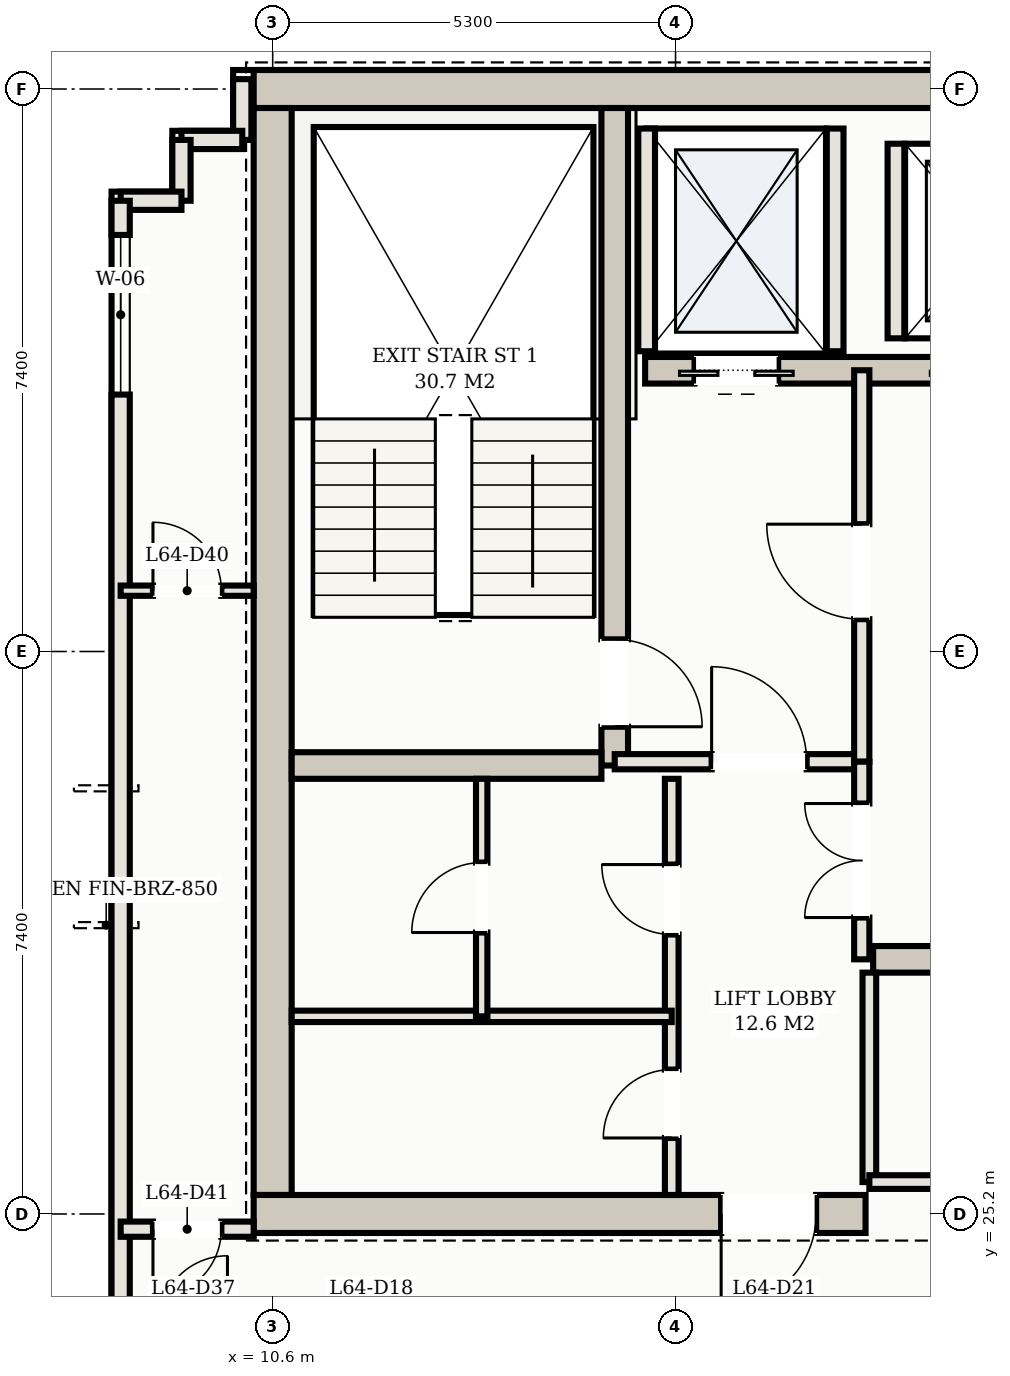
"""IFC4 building model, lengths in metres.
Left out: names, types, materials, properties, quantities, classifications, styles, units other than length and angle.
Written with IfcOpenShell. Run it as: python <this file> out.ifc"""

import sys

from ifc_helpers import new_model, si_unit, direction, frame, frame_2d, origin, place, context, subcontext, project, spatial, rectangle, extrude, element, fill, save


model = new_model("IFC4")
c1 = context("Model", 3, precision=1e-05, world=origin(), true_north=direction((0.0, 1.0)))
c2 = subcontext(c1, "Body", "Model", "MODEL_VIEW")
j1 = project(units=[si_unit("LENGTHUNIT", "METRE"), si_unit("PLANEANGLEUNIT", "RADIAN")], contexts=[c1])
p1 = place(None, origin())
s1 = spatial("IfcSite", under=j1, at=p1, CompositionType="ELEMENT")
p2 = place(p1, origin())
s2 = spatial("IfcBuilding", under=s1, at=p2, CompositionType="ELEMENT")
p3 = place(p2, frame((0.0, 0.0, 233.0)))
s3 = spatial("IfcBuildingStorey", under=s2, at=p3, CompositionType="ELEMENT", Elevation=233.0)
p4 = place(p3, frame((10.35, 40.0, 0.0), z_axis=(0.0, 0.0, 1.0), x_axis=(1.0, 0.0, 0.0)))
e1 = element("IfcWall", 1, at=p4, inside=s3, PredefinedType="SHEAR", context=c2, shape_type="SweptSolid", body=[
    extrude(rectangle(XDim=32.3, YDim=0.5, at=frame_2d((16.15, 0.0))), origin(), (0.0, 0.0, 1.0), 3.11),
])
p5 = place(p3, frame((10.6, 25.45, 0.0), z_axis=(0.0, 0.0, 1.0), x_axis=(0.0, 1.0, 0.0)))
e2 = element("IfcWall", 2, at=p5, inside=s3, PredefinedType="SHEAR", context=c2, shape_type="SweptSolid", body=[
    extrude(rectangle(XDim=14.3, YDim=0.5, at=frame_2d((7.15, 0.0))), origin(), (0.0, 0.0, 1.0), 3.11),
])
p6 = place(p3, frame((10.35, 25.2, 0.0), z_axis=(0.0, 0.0, 1.0), x_axis=(1.0, 0.0, 0.0)))
e3 = element("IfcWall", 3, at=p6, inside=s3, PredefinedType="SHEAR", context=c2, shape_type="SweptSolid", body=[
    extrude(rectangle(XDim=8.05, YDim=0.5, at=frame_2d((4.025, 0.0))), origin(), (0.0, 0.0, 1.0), 3.11),
])
p7 = place(p6, frame((6.15, 0.0, 0.0)))
e4 = element("IfcOpeningElement", 4, at=p7, cuts=e3, PredefinedType="OPENING", context=c2, shape_type="SweptSolid", body=[
    extrude(rectangle(XDim=1.25, YDim=2.2, at=frame_2d((0.625, 1.1))), frame((0.0, 0.26, 0.0), z_axis=(0.0, -1.0, 0.0), x_axis=(1.0, 0.0, 0.0)), (0.0, 0.0, 1.0), 0.52),
])
p8 = place(p3, frame((15.1, 31.1, 0.0), z_axis=(0.0, 0.0, 1.0), x_axis=(0.0, 1.0, 0.0)))
e5 = element("IfcWall", 5, at=p8, inside=s3, PredefinedType="SHEAR", context=c2, shape_type="SweptSolid", body=[
    extrude(rectangle(XDim=8.65, YDim=0.35, at=frame_2d((4.325, 0.0))), origin(), (0.0, 0.0, 1.0), 3.11),
])
p9 = place(p8, frame((0.51, 0.0, 0.0)))
e6 = element("IfcOpeningElement", 6, at=p9, cuts=e5, PredefinedType="OPENING", context=c2, shape_type="SweptSolid", body=[
    extrude(rectangle(XDim=1.15, YDim=2.2, at=frame_2d((0.575, 1.1))), frame((0.0, 0.185, 0.0), z_axis=(0.0, -1.0, 0.0), x_axis=(1.0, 0.0, 0.0)), (0.0, 0.0, 1.0), 0.37),
])
p10 = place(p3, frame((10.85, 31.1, 0.0), z_axis=(0.0, 0.0, 1.0), x_axis=(1.0, 0.0, 0.0)))
e7 = element("IfcWall", 7, at=p10, inside=s3, PredefinedType="SHEAR", context=c2, shape_type="SweptSolid", body=[
    extrude(rectangle(XDim=4.075, YDim=0.35, at=frame_2d((2.038, 0.0))), origin(), (0.0, 0.0, 1.0), 3.11),
])
p11 = place(p3, frame((15.5, 36.3, 0.0), z_axis=(0.0, 0.0, 1.0), x_axis=(1.0, 0.0, 0.0)))
e8 = element("IfcWall", 8, at=p11, inside=s3, PredefinedType="SHEAR", context=c2, shape_type="SweptSolid", body=[
    extrude(rectangle(XDim=22.0, YDim=0.35, at=frame_2d((11.0, 0.0))), origin(), (0.0, 0.0, 1.0), 3.11),
])
p12 = place(p11, frame((0.65, 0.0, 0.0)))
e9 = element("IfcOpeningElement", 9, at=p12, cuts=e8, PredefinedType="OPENING", context=c2, shape_type="SweptSolid", body=[
    extrude(rectangle(XDim=1.1, YDim=2.15, at=frame_2d((0.55, 1.075))), frame((0.0, 0.185, 0.0), z_axis=(0.0, -1.0, 0.0), x_axis=(1.0, 0.0, 0.0)), (0.0, 0.0, 1.0), 0.37),
])
p13 = place(p11, frame((20.25, 0.0, 0.0)))
e10 = element("IfcOpeningElement", 10, at=p13, cuts=e8, PredefinedType="OPENING", context=c2, shape_type="SweptSolid", body=[
    extrude(rectangle(XDim=1.1, YDim=2.15, at=frame_2d((0.55, 1.075))), frame((0.0, 0.185, 0.0), z_axis=(0.0, -1.0, 0.0), x_axis=(1.0, 0.0, 0.0)), (0.0, 0.0, 1.0), 0.37),
])
p14 = place(p11, frame((17.05, 0.0, 0.0)))
e11 = element("IfcOpeningElement", 11, at=p14, cuts=e8, PredefinedType="OPENING", context=c2, shape_type="SweptSolid", body=[
    extrude(rectangle(XDim=1.3, YDim=2.2, at=frame_2d((0.65, 1.1))), frame((0.0, 0.185, 0.0), z_axis=(0.0, -1.0, 0.0), x_axis=(1.0, 0.0, 0.0)), (0.0, 0.0, 1.0), 0.37),
])
p15 = place(p11, frame((3.95, 0.0, 0.0)))
e12 = element("IfcOpeningElement", 12, at=p15, cuts=e8, PredefinedType="OPENING", context=c2, shape_type="SweptSolid", body=[
    extrude(rectangle(XDim=1.1, YDim=2.15, at=frame_2d((0.55, 1.075))), frame((0.0, 0.185, 0.0), z_axis=(0.0, -1.0, 0.0), x_axis=(1.0, 0.0, 0.0)), (0.0, 0.0, 1.0), 0.37),
])
p16 = place(p11, frame((6.55, 0.0, 0.0)))
e13 = element("IfcOpeningElement", 13, at=p16, cuts=e8, PredefinedType="OPENING", context=c2, shape_type="SweptSolid", body=[
    extrude(rectangle(XDim=1.1, YDim=2.15, at=frame_2d((0.55, 1.075))), frame((0.0, 0.185, 0.0), z_axis=(0.0, -1.0, 0.0), x_axis=(1.0, 0.0, 0.0)), (0.0, 0.0, 1.0), 0.37),
])
p17 = place(p11, frame((9.15, 0.0, 0.0)))
e14 = element("IfcOpeningElement", 14, at=p17, cuts=e8, PredefinedType="OPENING", context=c2, shape_type="SweptSolid", body=[
    extrude(rectangle(XDim=1.1, YDim=2.15, at=frame_2d((0.55, 1.075))), frame((0.0, 0.185, 0.0), z_axis=(0.0, -1.0, 0.0), x_axis=(1.0, 0.0, 0.0)), (0.0, 0.0, 1.0), 0.37),
])
p18 = place(p3, frame((18.5, 28.55, 0.0), z_axis=(0.0, 0.0, 1.0), x_axis=(1.0, 0.0, 0.0)))
e15 = element("IfcWall", 15, at=p18, inside=s3, PredefinedType="SHEAR", context=c2, shape_type="SweptSolid", body=[
    extrude(rectangle(XDim=16.0, YDim=0.35, at=frame_2d((8.0, 0.0))), origin(), (0.0, 0.0, 1.0), 3.11),
])
for number, where, z_axis, x_axis in (
    (16, (15.52, 36.55, 0.0), (0.0, 0.0, 1.0), (0.0, 1.0, 0.0)),
    (17, (18.0, 36.55, 0.0), (0.0, 0.0, 1.0), (0.0, 1.0, 0.0)),
):
    element("IfcWall", number, at=place(p3, frame(where, z_axis=z_axis, x_axis=x_axis)), inside=s3, PredefinedType="SOLIDWALL", context=c2, shape_type="SweptSolid", body=[
        extrude(rectangle(XDim=2.93, YDim=0.22, at=frame_2d((1.465, 0.0))), origin(), (0.0, 0.0, 1.0), 3.11),
    ])
p19 = place(p3, frame((18.8, 36.72, 0.0), z_axis=(0.0, 0.0, 1.0), x_axis=(0.0, 1.0, 0.0)))
e18 = element("IfcWall", 18, at=p19, inside=s3, PredefinedType="SOLIDWALL", context=c2, shape_type="SweptSolid", body=[
    extrude(rectangle(XDim=2.56, YDim=0.22, at=frame_2d((1.28, 0.0))), origin(), (0.0, 0.0, 1.0), 3.11),
])
p20 = place(p3, frame((10.2, 40.13, 0.0), z_axis=(0.0, 0.0, 1.0), x_axis=(0.0, -1.0, 0.0)))
e19 = element("IfcWall", 19, at=p20, inside=s3, PredefinedType="SOLIDWALL", context=c2, shape_type="SweptSolid", body=[
    extrude(rectangle(XDim=0.8, YDim=0.24, at=frame_2d((0.4, 0.0))), origin(), (0.0, 0.0, 1.0), 3.11),
])
for number, where, z_axis, x_axis in (
    (20, (10.2, 39.33, 0.0), (0.0, 0.0, 1.0), (-1.0, 0.0, 0.0)),
    (21, (9.4, 39.33, 0.0), (0.0, 0.0, 1.0), (0.0, -1.0, 0.0)),
):
    element("IfcWall", number, at=place(p3, frame(where, z_axis=z_axis, x_axis=x_axis)), inside=s3, PredefinedType="SOLIDWALL", context=c2, shape_type="SweptSolid", body=[
        extrude(rectangle(XDim=0.8, YDim=0.24, at=frame_2d((0.4, 0.0))), origin(), (0.0, 0.0, 1.0), 3.11),
    ])
p21 = place(p3, frame((9.4, 38.53, 0.0), z_axis=(0.0, 0.0, 1.0), x_axis=(-1.0, 0.0, 0.0)))
e22 = element("IfcWall", 22, at=p21, inside=s3, PredefinedType="SOLIDWALL", context=c2, shape_type="SweptSolid", body=[
    extrude(rectangle(XDim=0.8, YDim=0.24, at=frame_2d((0.4, 0.0))), origin(), (0.0, 0.0, 1.0), 3.11),
])
p22 = place(p3, frame((8.6, 38.53, 0.0), z_axis=(0.0, 0.0, 1.0), x_axis=(0.0, -1.0, 0.0)))
e23 = element("IfcWall", 23, at=p22, inside=s3, PredefinedType="SOLIDWALL", context=c2, shape_type="SweptSolid", body=[
    extrude(rectangle(XDim=26.01, YDim=0.24, at=frame_2d((13.005, 0.0))), origin(), (0.0, 0.0, 1.0), 3.11),
])
p23 = place(p22, frame((19.73, 0.0, 0.0)))
e24 = element("IfcOpeningElement", 24, at=p23, cuts=e23, PredefinedType="OPENING", context=c2, shape_type="SweptSolid", body=[
    extrude(rectangle(XDim=1.8, YDim=2.2, at=frame_2d((0.9, 1.1))), frame((0.0, 0.13, 0.0), z_axis=(0.0, -1.0, 0.0), x_axis=(1.0, 0.0, 0.0)), (0.0, 0.0, 1.0), 0.26),
])
p24 = place(p22, frame((0.45, 0.0, 0.75)))
e25 = element("IfcOpeningElement", 25, at=p24, cuts=e23, PredefinedType="OPENING", context=c2, shape_type="SweptSolid", body=[
    extrude(rectangle(XDim=2.1, YDim=1.65, at=frame_2d((1.05, 0.825))), frame((0.0, 0.13, 0.0), z_axis=(0.0, -1.0, 0.0), x_axis=(1.0, 0.0, 0.0)), (0.0, 0.0, 1.0), 0.26),
])
p25 = place(p3, frame((15.1, 31.15, 0.0), z_axis=(0.0, 0.0, 1.0), x_axis=(1.0, 0.0, 0.0)))
e26 = element("IfcWall", 26, at=p25, inside=s3, PredefinedType="PARTITIONING", context=c2, shape_type="SweptSolid", body=[
    extrude(rectangle(XDim=3.25, YDim=0.2, at=frame_2d((1.625, 0.0))), origin(), (0.0, 0.0, 1.0), 2.45),
])
p26 = place(p25, frame((1.275, 0.0, 0.0)))
e27 = element("IfcOpeningElement", 27, at=p26, cuts=e26, PredefinedType="OPENING", context=c2, shape_type="SweptSolid", body=[
    extrude(rectangle(XDim=1.25, YDim=2.2, at=frame_2d((0.625, 1.1))), frame((0.0, 0.11, 0.0), z_axis=(0.0, -1.0, 0.0), x_axis=(1.0, 0.0, 0.0)), (0.0, 0.0, 1.0), 0.22),
])
p27 = place(p3, frame((18.35, 31.15, 0.0), z_axis=(0.0, 0.0, 1.0), x_axis=(0.0, 1.0, 0.0)))
e28 = element("IfcWall", 28, at=p27, inside=s3, PredefinedType="PARTITIONING", context=c2, shape_type="SweptSolid", body=[
    extrude(rectangle(XDim=5.15, YDim=0.2, at=frame_2d((2.575, 0.0))), origin(), (0.0, 0.0, 1.0), 2.45),
])
p28 = place(p27, frame((1.875, 0.0, 0.0)))
e29 = element("IfcOpeningElement", 29, at=p28, cuts=e28, PredefinedType="OPENING", context=c2, shape_type="SweptSolid", body=[
    extrude(rectangle(XDim=1.25, YDim=2.2, at=frame_2d((0.625, 1.1))), frame((0.0, 0.11, 0.0), z_axis=(0.0, -1.0, 0.0), x_axis=(1.0, 0.0, 0.0)), (0.0, 0.0, 1.0), 0.22),
])
p29 = place(p3, frame((15.85, 25.45, 0.0), z_axis=(0.0, 0.0, 1.0), x_axis=(0.0, 1.0, 0.0)))
e30 = element("IfcWall", 30, at=p29, inside=s3, PredefinedType="PARTITIONING", context=c2, shape_type="SweptSolid", body=[
    extrude(rectangle(XDim=5.475, YDim=0.18, at=frame_2d((2.738, 0.0))), origin(), (0.0, 0.0, 1.0), 2.45),
])
p30 = place(p29, frame((0.75, 0.0, 0.0)))
e31 = element("IfcOpeningElement", 31, at=p30, cuts=e30, PredefinedType="OPENING", context=c2, shape_type="SweptSolid", body=[
    extrude(rectangle(XDim=0.9, YDim=2.15, at=frame_2d((0.45, 1.075))), frame((0.0, 0.1, 0.0), z_axis=(0.0, -1.0, 0.0), x_axis=(1.0, 0.0, 0.0)), (0.0, 0.0, 1.0), 0.2),
])
p31 = place(p29, frame((3.427, 0.0, 0.0)))
e32 = element("IfcOpeningElement", 32, at=p31, cuts=e30, PredefinedType="OPENING", context=c2, shape_type="SweptSolid", body=[
    extrude(rectangle(XDim=0.92, YDim=2.15, at=frame_2d((0.46, 1.075))), frame((0.0, 0.1, 0.0), z_axis=(0.0, -1.0, 0.0), x_axis=(1.0, 0.0, 0.0)), (0.0, 0.0, 1.0), 0.2),
])
p32 = place(p3, frame((10.85, 27.8, 0.0), z_axis=(0.0, 0.0, 1.0), x_axis=(1.0, 0.0, 0.0)))
e33 = element("IfcWall", 33, at=p32, inside=s3, PredefinedType="PARTITIONING", context=c2, shape_type="SweptSolid", body=[
    extrude(rectangle(XDim=5.0, YDim=0.15, at=frame_2d((2.5, 0.0))), origin(), (0.0, 0.0, 1.0), 2.45),
])
p33 = place(p3, frame((13.35, 27.8, 0.0), z_axis=(0.0, 0.0, 1.0), x_axis=(0.0, 1.0, 0.0)))
e34 = element("IfcWall", 34, at=p33, inside=s3, PredefinedType="PARTITIONING", context=c2, shape_type="SweptSolid", body=[
    extrude(rectangle(XDim=3.125, YDim=0.15, at=frame_2d((1.562, 0.0))), origin(), (0.0, 0.0, 1.0), 2.45),
])
p34 = place(p33, frame((1.103, 0.0, 0.0)))
e35 = element("IfcOpeningElement", 35, at=p34, cuts=e34, PredefinedType="OPENING", context=c2, shape_type="SweptSolid", body=[
    extrude(rectangle(XDim=0.92, YDim=2.15, at=frame_2d((0.46, 1.075))), frame((0.0, 0.085, 0.0), z_axis=(0.0, -1.0, 0.0), x_axis=(1.0, 0.0, 0.0)), (0.0, 0.0, 1.0), 0.17),
])
p35 = place(p3, frame((18.35, 28.55, 0.0), z_axis=(0.0, 0.0, 1.0), x_axis=(0.0, 1.0, 0.0)))
e36 = element("IfcWall", 36, at=p35, inside=s3, PredefinedType="PARTITIONING", context=c2, shape_type="SweptSolid", body=[
    extrude(rectangle(XDim=2.6, YDim=0.2, at=frame_2d((1.3, 0.0))), origin(), (0.0, 0.0, 1.0), 2.45),
])
p36 = place(p35, frame((0.55, 0.0, 0.0)))
e37 = element("IfcOpeningElement", 37, at=p36, cuts=e36, PredefinedType="OPENING", context=c2, shape_type="SweptSolid", body=[
    extrude(rectangle(XDim=1.5, YDim=2.25, at=frame_2d((0.75, 1.125))), frame((0.0, 0.11, 0.0), z_axis=(0.0, -1.0, 0.0), x_axis=(1.0, 0.0, 0.0)), (0.0, 0.0, 1.0), 0.22),
])
p37 = place(p3, frame((18.45, 25.62, 0.0), z_axis=(0.0, 0.0, 1.0), x_axis=(0.0, 1.0, 0.0)))
e38 = element("IfcWall", 38, at=p37, inside=s3, PredefinedType="PARTITIONING", context=c2, shape_type="SweptSolid", body=[
    extrude(rectangle(XDim=2.755, YDim=0.18, at=frame_2d((1.377, 0.0))), origin(), (0.0, 0.0, 1.0), 2.45),
])
p38 = place(p3, frame((18.45, 25.62, 0.0), z_axis=(0.0, 0.0, 1.0), x_axis=(1.0, 0.0, 0.0)))
e39 = element("IfcWall", 39, at=p38, inside=s3, PredefinedType="PARTITIONING", context=c2, shape_type="SweptSolid", body=[
    extrude(rectangle(XDim=7.9, YDim=0.18, at=frame_2d((3.95, 0.0))), origin(), (0.0, 0.0, 1.0), 2.45),
])
p39 = place(p38, frame((3.34, 0.0, 0.0)))
e40 = element("IfcOpeningElement", 40, at=p39, cuts=e39, PredefinedType="OPENING", context=c2, shape_type="SweptSolid", body=[
    extrude(rectangle(XDim=0.92, YDim=2.15, at=frame_2d((0.46, 1.075))), frame((0.0, 0.1, 0.0), z_axis=(0.0, -1.0, 0.0), x_axis=(1.0, 0.0, 0.0)), (0.0, 0.0, 1.0), 0.2),
])
p40 = place(p3, frame((8.6, 25.0, 0.0), z_axis=(0.0, 0.0, 1.0), x_axis=(1.0, 0.0, 0.0)))
e41 = element("IfcWall", 41, at=p40, inside=s3, PredefinedType="PARTITIONING", context=c2, shape_type="SweptSolid", body=[
    extrude(rectangle(XDim=1.75, YDim=0.2, at=frame_2d((0.875, 0.0))), origin(), (0.0, 0.0, 1.0), 2.45),
])
p41 = place(p40, frame((0.425, 0.0, 0.0)))
e42 = element("IfcOpeningElement", 42, at=p41, cuts=e41, PredefinedType="OPENING", context=c2, shape_type="SweptSolid", body=[
    extrude(rectangle(XDim=0.9, YDim=2.15, at=frame_2d((0.45, 1.075))), frame((0.0, 0.11, 0.0), z_axis=(0.0, -1.0, 0.0), x_axis=(1.0, 0.0, 0.0)), (0.0, 0.0, 1.0), 0.22),
])
p42 = place(p3, frame((8.6, 33.4, 0.0), z_axis=(0.0, 0.0, 1.0), x_axis=(1.0, 0.0, 0.0)))
e43 = element("IfcWall", 43, at=p42, inside=s3, PredefinedType="PARTITIONING", context=c2, shape_type="SweptSolid", body=[
    extrude(rectangle(XDim=1.75, YDim=0.135, at=frame_2d((0.875, 0.0))), origin(), (0.0, 0.0, 1.0), 2.45),
])
p43 = place(p42, frame((0.425, 0.0, 0.0)))
e44 = element("IfcOpeningElement", 44, at=p43, cuts=e43, PredefinedType="OPENING", context=c2, shape_type="SweptSolid", body=[
    extrude(rectangle(XDim=0.9, YDim=2.15, at=frame_2d((0.45, 1.075))), frame((0.0, 0.078, 0.0), z_axis=(0.0, -1.0, 0.0), x_axis=(1.0, 0.0, 0.0)), (0.0, 0.0, 1.0), 0.155),
])
p44 = place(p12, frame((1.1, 0.0, 0.0), z_axis=(0.0, 0.0, 1.0), x_axis=(-1.0, 0.0, 0.0)))
e45 = element("IfcDoor", 45, at=p44, inside=s3, OperationType="DOUBLE_DOOR_SLIDING", PredefinedType="DOOR", context=c2, shape_type="SweptSolid", body=[
    extrude(rectangle(XDim=1.1, YDim=2.15, at=frame_2d((0.55, 1.075))), frame((0.0, 0.025, 0.0), z_axis=(0.0, -1.0, 0.0), x_axis=(1.0, 0.0, 0.0)), (0.0, 0.0, 1.0), 0.05),
])
fill(e9, e45)
p45 = place(p24, origin())
e46 = element("IfcWindow", 46, at=p45, inside=s3, PartitioningType="SINGLE_PANEL", PredefinedType="WINDOW", context=c2, shape_type="SweptSolid", body=[
    extrude(rectangle(XDim=2.1, YDim=1.65, at=frame_2d((1.05, 0.825))), frame((0.0, 0.03, 0.0), z_axis=(0.0, -1.0, 0.0), x_axis=(1.0, 0.0, 0.0)), (0.0, 0.0, 1.0), 0.06),
])
fill(e25, e46)
p46 = place(p7, frame((1.25, 0.0, 0.0), z_axis=(0.0, 0.0, 1.0), x_axis=(-1.0, 0.0, 0.0)))
e47 = element("IfcDoor", 47, at=p46, inside=s3, OperationType="SINGLE_SWING_RIGHT", PredefinedType="DOOR", context=c2, shape_type="SweptSolid", body=[
    extrude(rectangle(XDim=1.25, YDim=2.2, at=frame_2d((0.625, 1.1))), frame((0.0, 0.025, 0.0), z_axis=(0.0, -1.0, 0.0), x_axis=(1.0, 0.0, 0.0)), (0.0, 0.0, 1.0), 0.05),
])
fill(e4, e47)
p47 = place(p26, origin())
e48 = element("IfcDoor", 48, at=p47, inside=s3, OperationType="SINGLE_SWING_LEFT", PredefinedType="DOOR", context=c2, shape_type="SweptSolid", body=[
    extrude(rectangle(XDim=1.25, YDim=2.2, at=frame_2d((0.625, 1.1))), frame((0.0, 0.025, 0.0), z_axis=(0.0, -1.0, 0.0), x_axis=(1.0, 0.0, 0.0)), (0.0, 0.0, 1.0), 0.05),
])
fill(e27, e48)
p48 = place(p28, origin())
e49 = element("IfcDoor", 49, at=p48, inside=s3, OperationType="SINGLE_SWING_RIGHT", PredefinedType="DOOR", context=c2, shape_type="SweptSolid", body=[
    extrude(rectangle(XDim=1.25, YDim=2.2, at=frame_2d((0.625, 1.1))), frame((0.0, 0.025, 0.0), z_axis=(0.0, -1.0, 0.0), x_axis=(1.0, 0.0, 0.0)), (0.0, 0.0, 1.0), 0.05),
])
fill(e29, e49)
p49 = place(p9, frame((1.15, 0.0, 0.0), z_axis=(0.0, 0.0, 1.0), x_axis=(-1.0, 0.0, 0.0)))
e50 = element("IfcDoor", 50, at=p49, inside=s3, OperationType="SINGLE_SWING_RIGHT", PredefinedType="DOOR", context=c2, shape_type="SweptSolid", body=[
    extrude(rectangle(XDim=1.15, YDim=2.2, at=frame_2d((0.575, 1.1))), frame((0.0, 0.025, 0.0), z_axis=(0.0, -1.0, 0.0), x_axis=(1.0, 0.0, 0.0)), (0.0, 0.0, 1.0), 0.05),
])
fill(e6, e50)
p50 = place(p30, origin())
e51 = element("IfcDoor", 51, at=p50, inside=s3, OperationType="SINGLE_SWING_LEFT", PredefinedType="DOOR", context=c2, shape_type="SweptSolid", body=[
    extrude(rectangle(XDim=0.9, YDim=2.15, at=frame_2d((0.45, 1.075))), frame((0.0, 0.025, 0.0), z_axis=(0.0, -1.0, 0.0), x_axis=(1.0, 0.0, 0.0)), (0.0, 0.0, 1.0), 0.05),
])
fill(e31, e51)
p51 = place(p31, origin())
e52 = element("IfcDoor", 52, at=p51, inside=s3, OperationType="SINGLE_SWING_RIGHT", PredefinedType="DOOR", context=c2, shape_type="SweptSolid", body=[
    extrude(rectangle(XDim=0.92, YDim=2.15, at=frame_2d((0.46, 1.075))), frame((0.0, 0.025, 0.0), z_axis=(0.0, -1.0, 0.0), x_axis=(1.0, 0.0, 0.0)), (0.0, 0.0, 1.0), 0.05),
])
fill(e32, e52)
p52 = place(p34, origin())
e53 = element("IfcDoor", 53, at=p52, inside=s3, OperationType="SINGLE_SWING_LEFT", PredefinedType="DOOR", context=c2, shape_type="SweptSolid", body=[
    extrude(rectangle(XDim=0.92, YDim=2.15, at=frame_2d((0.46, 1.075))), frame((0.0, 0.025, 0.0), z_axis=(0.0, -1.0, 0.0), x_axis=(1.0, 0.0, 0.0)), (0.0, 0.0, 1.0), 0.05),
])
fill(e35, e53)
p53 = place(p36, origin())
e54 = element("IfcDoor", 54, at=p53, inside=s3, OperationType="DOUBLE_DOOR_SINGLE_SWING", PredefinedType="DOOR", context=c2, shape_type="SweptSolid", body=[
    extrude(rectangle(XDim=1.5, YDim=2.25, at=frame_2d((0.75, 1.125))), frame((0.0, 0.025, 0.0), z_axis=(0.0, -1.0, 0.0), x_axis=(1.0, 0.0, 0.0)), (0.0, 0.0, 1.0), 0.05),
])
fill(e37, e54)
p54 = place(p43, origin())
e55 = element("IfcDoor", 55, at=p54, inside=s3, OperationType="SINGLE_SWING_LEFT", PredefinedType="DOOR", context=c2, shape_type="SweptSolid", body=[
    extrude(rectangle(XDim=0.9, YDim=2.15, at=frame_2d((0.45, 1.075))), frame((0.0, 0.025, 0.0), z_axis=(0.0, -1.0, 0.0), x_axis=(1.0, 0.0, 0.0)), (0.0, 0.0, 1.0), 0.05),
])
fill(e44, e55)
p55 = place(p41, frame((0.9, 0.0, 0.0), z_axis=(0.0, 0.0, 1.0), x_axis=(-1.0, 0.0, 0.0)))
e56 = element("IfcDoor", 56, at=p55, inside=s3, OperationType="SINGLE_SWING_RIGHT", PredefinedType="DOOR", context=c2, shape_type="SweptSolid", body=[
    extrude(rectangle(XDim=0.9, YDim=2.15, at=frame_2d((0.45, 1.075))), frame((0.0, 0.025, 0.0), z_axis=(0.0, -1.0, 0.0), x_axis=(1.0, 0.0, 0.0)), (0.0, 0.0, 1.0), 0.05),
])
fill(e42, e56)
save(model, sys.argv[1])
